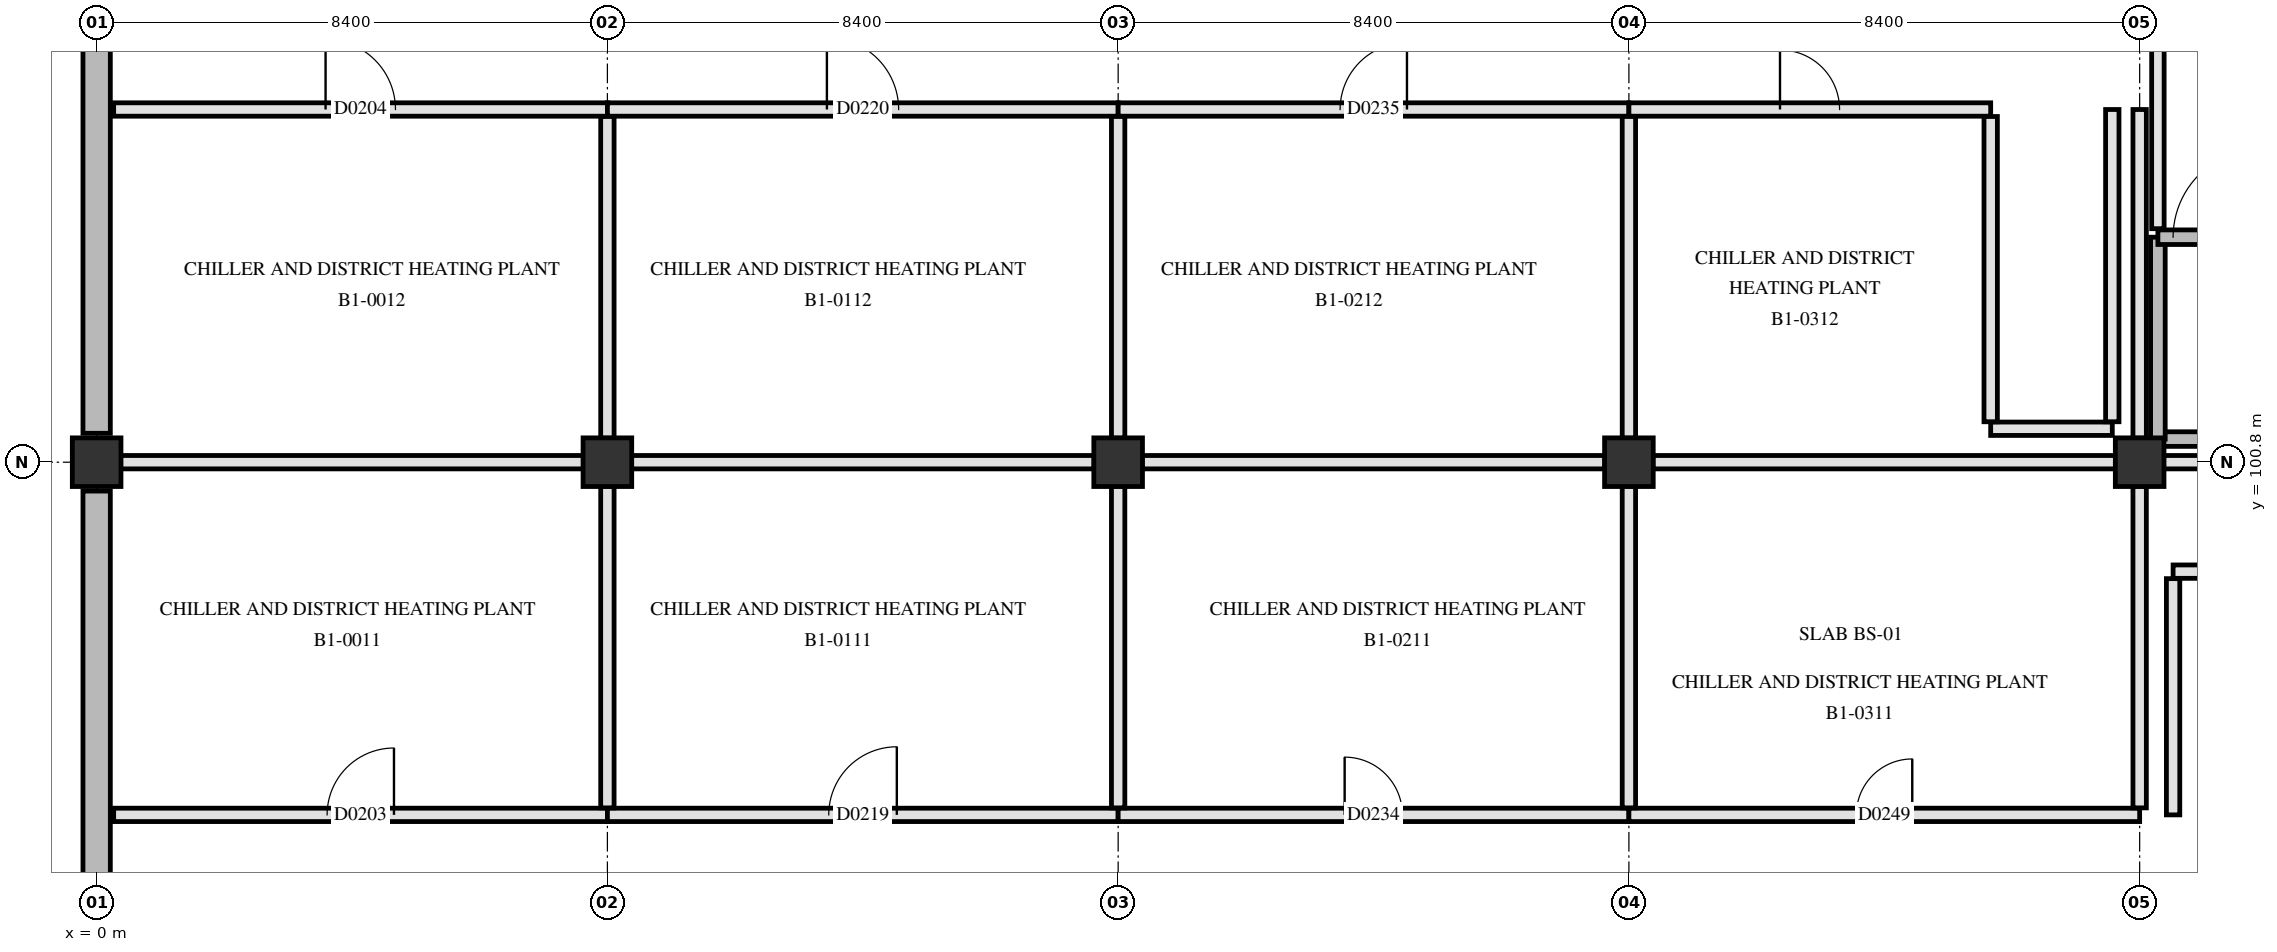
"""IFC4 building model, lengths in metres.
Left out: names, types, materials, properties, quantities, classifications, styles, units other than length and angle.
Written with IfcOpenShell. Run it as: python <this file> out.ifc"""

import sys

from ifc_helpers import new_model, si_unit, direction, frame, frame_2d, origin, origin_2d, place, context, subcontext, project, spatial, rectangle, extrude, element, fill, save


model = new_model("IFC4")
c1 = context("Model", 3, precision=1e-05, world=origin(), true_north=direction((0.0, 1.0)))
c2 = subcontext(c1, "Body", "Model", "MODEL_VIEW")
j1 = project(units=[si_unit("LENGTHUNIT", "METRE"), si_unit("PLANEANGLEUNIT", "RADIAN")], contexts=[c1])
p1 = place(None, origin())
s1 = spatial("IfcSite", under=j1, at=p1, CompositionType="ELEMENT")
p2 = place(p1, origin())
s2 = spatial("IfcBuilding", under=s1, at=p2, CompositionType="ELEMENT")
p3 = place(p2, frame((0.0, 0.0, -5.4)))
s3 = spatial("IfcBuildingStorey", under=s2, at=p3, CompositionType="ELEMENT", Elevation=-5.4)
for number, where, z_axis, x_axis in (
    (1, (0.0, 100.8, 0.0), (0.0, 0.0, 1.0), (1.0, 0.0, 0.0)),
    (2, (8.4, 100.8, 0.0), (0.0, 0.0, 1.0), (1.0, 0.0, 0.0)),
    (3, (16.8, 100.8, 0.0), (0.0, 0.0, 1.0), (1.0, 0.0, 0.0)),
    (4, (25.2, 100.8, 0.0), (0.0, 0.0, 1.0), (1.0, 0.0, 0.0)),
    (5, (33.6, 100.8, 0.0), (0.0, 0.0, 1.0), (1.0, 0.0, 0.0)),
):
    element("IfcColumn", number, at=place(p3, frame(where, z_axis=z_axis, x_axis=x_axis)), inside=s3, PredefinedType="COLUMN", context=c2, shape_type="SweptSolid", body=[
        extrude(rectangle(XDim=0.8, YDim=0.8, at=origin_2d()), origin(), (0.0, 0.0, 1.0), 5.4),
    ])
p4 = place(p3, frame((0.0, 92.875, 0.0), z_axis=(0.0, 0.0, 1.0), x_axis=(0.0, 1.0, 0.0)))
e6 = element("IfcWall", 6, at=p4, inside=s3, PredefinedType="SOLIDWALL", context=c2, shape_type="SweptSolid", body=[
    extrude(rectangle(XDim=7.45, YDim=0.45, at=frame_2d((3.725, 0.0))), origin(), (0.0, 0.0, 1.0), 5.08),
])
p5 = place(p3, frame((0.0, 101.275, 0.0), z_axis=(0.0, 0.0, 1.0), x_axis=(0.0, 1.0, 0.0)))
e7 = element("IfcWall", 7, at=p5, inside=s3, PredefinedType="SOLIDWALL", context=c2, shape_type="SweptSolid", body=[
    extrude(rectangle(XDim=7.45, YDim=0.45, at=frame_2d((3.725, 0.0))), origin(), (0.0, 0.0, 1.0), 5.08),
])
p6 = place(p3, frame((33.9, 101.18, 0.0), z_axis=(0.0, 0.0, 1.0), x_axis=(1.0, 0.0, 0.0)))
e8 = element("IfcWall", 8, at=p6, inside=s3, PredefinedType="SHEAR", context=c2, shape_type="SweptSolid", body=[
    extrude(rectangle(XDim=7.82, YDim=0.24, at=frame_2d((3.91, 0.0))), origin(), (0.0, 0.0, 1.0), 5.08),
])
p7 = place(p3, frame((33.9, 101.18, 0.0), z_axis=(0.0, 0.0, 1.0), x_axis=(0.0, 1.0, 0.0)))
e9 = element("IfcWall", 9, at=p7, inside=s3, PredefinedType="SHEAR", context=c2, shape_type="SweptSolid", body=[
    extrude(rectangle(XDim=3.32, YDim=0.24, at=frame_2d((1.66, 0.0))), origin(), (0.0, 0.0, 1.0), 5.08),
])
p8 = place(p3, frame((33.9, 104.5, 0.0), z_axis=(0.0, 0.0, 1.0), x_axis=(1.0, 0.0, 0.0)))
e10 = element("IfcWall", 10, at=p8, inside=s3, PredefinedType="SHEAR", context=c2, shape_type="SweptSolid", body=[
    extrude(rectangle(XDim=7.82, YDim=0.24, at=frame_2d((3.91, 0.0))), origin(), (0.0, 0.0, 1.0), 5.08),
])
p9 = place(p8, frame((0.25, 0.0, 0.0)))
e11 = element("IfcOpeningElement", 11, at=p9, cuts=e10, PredefinedType="OPENING", context=c2, shape_type="SweptSolid", body=[
    extrude(rectangle(XDim=1.45, YDim=2.2, at=frame_2d((0.725, 1.1))), frame((0.0, 0.13, 0.0), z_axis=(0.0, -1.0, 0.0), x_axis=(1.0, 0.0, 0.0)), (0.0, 0.0, 1.0), 0.26),
])
p10 = place(p3, frame((33.9, 104.64, 0.0), z_axis=(0.0, 0.0, 1.0), x_axis=(0.0, 1.0, 0.0)))
e12 = element("IfcWall", 12, at=p10, inside=s3, PredefinedType="PARTITIONING", context=c2, shape_type="SweptSolid", body=[
    extrude(rectangle(XDim=4.12, YDim=0.205, at=frame_2d((2.06, 0.0))), origin(), (0.0, 0.0, 1.0), 4.47),
])
p11 = place(p3, frame((0.28, 95.0, 0.0), z_axis=(0.0, 0.0, 1.0), x_axis=(1.0, 0.0, 0.0)))
e13 = element("IfcWall", 13, at=p11, inside=s3, PredefinedType="PARTITIONING", context=c2, shape_type="SweptSolid", body=[
    extrude(rectangle(XDim=8.12, YDim=0.22, at=frame_2d((4.06, 0.0))), origin(), (0.0, 0.0, 1.0), 4.47),
])
p12 = place(p11, frame((3.51, 0.0, 0.0)))
e14 = element("IfcOpeningElement", 14, at=p12, cuts=e13, PredefinedType="OPENING", context=c2, shape_type="SweptSolid", body=[
    extrude(rectangle(XDim=1.1, YDim=2.15, at=frame_2d((0.55, 1.075))), frame((0.0, 0.12, 0.0), z_axis=(0.0, -1.0, 0.0), x_axis=(1.0, 0.0, 0.0)), (0.0, 0.0, 1.0), 0.24),
])
p13 = place(p3, frame((8.4, 95.0, 0.0), z_axis=(0.0, 0.0, 1.0), x_axis=(1.0, 0.0, 0.0)))
e15 = element("IfcWall", 15, at=p13, inside=s3, PredefinedType="PARTITIONING", context=c2, shape_type="SweptSolid", body=[
    extrude(rectangle(XDim=8.4, YDim=0.22, at=frame_2d((4.2, 0.0))), origin(), (0.0, 0.0, 1.0), 4.47),
])
p14 = place(p13, frame((3.64, 0.0, 0.0)))
e16 = element("IfcOpeningElement", 16, at=p14, cuts=e15, PredefinedType="OPENING", context=c2, shape_type="SweptSolid", body=[
    extrude(rectangle(XDim=1.12, YDim=2.18, at=frame_2d((0.56, 1.09))), frame((0.0, 0.12, 0.0), z_axis=(0.0, -1.0, 0.0), x_axis=(1.0, 0.0, 0.0)), (0.0, 0.0, 1.0), 0.24),
])
p15 = place(p3, frame((16.8, 95.0, 0.0), z_axis=(0.0, 0.0, 1.0), x_axis=(1.0, 0.0, 0.0)))
e17 = element("IfcWall", 17, at=p15, inside=s3, PredefinedType="PARTITIONING", context=c2, shape_type="SweptSolid", body=[
    extrude(rectangle(XDim=8.4, YDim=0.22, at=frame_2d((4.2, 0.0))), origin(), (0.0, 0.0, 1.0), 4.47),
])
p16 = place(p15, frame((3.725, 0.0, 0.0)))
e18 = element("IfcOpeningElement", 18, at=p16, cuts=e17, PredefinedType="OPENING", context=c2, shape_type="SweptSolid", body=[
    extrude(rectangle(XDim=0.95, YDim=2.1, at=frame_2d((0.475, 1.05))), frame((0.0, 0.12, 0.0), z_axis=(0.0, -1.0, 0.0), x_axis=(1.0, 0.0, 0.0)), (0.0, 0.0, 1.0), 0.24),
])
p17 = place(p3, frame((25.2, 95.0, 0.0), z_axis=(0.0, 0.0, 1.0), x_axis=(1.0, 0.0, 0.0)))
e19 = element("IfcWall", 19, at=p17, inside=s3, PredefinedType="PARTITIONING", context=c2, shape_type="SweptSolid", body=[
    extrude(rectangle(XDim=8.4, YDim=0.22, at=frame_2d((4.2, 0.0))), origin(), (0.0, 0.0, 1.0), 4.47),
])
p18 = place(p17, frame((3.74, 0.0, 0.0)))
e20 = element("IfcOpeningElement", 20, at=p18, cuts=e19, PredefinedType="OPENING", context=c2, shape_type="SweptSolid", body=[
    extrude(rectangle(XDim=0.92, YDim=2.08, at=frame_2d((0.46, 1.04))), frame((0.0, 0.12, 0.0), z_axis=(0.0, -1.0, 0.0), x_axis=(1.0, 0.0, 0.0)), (0.0, 0.0, 1.0), 0.24),
])
p19 = place(p3, frame((34.15, 99.0, 0.0), z_axis=(0.0, 0.0, 1.0), x_axis=(1.0, 0.0, 0.0)))
e21 = element("IfcWall", 21, at=p19, inside=s3, PredefinedType="PARTITIONING", context=c2, shape_type="SweptSolid", body=[
    extrude(rectangle(XDim=2.1, YDim=0.22, at=frame_2d((1.05, 0.0))), origin(), (0.0, 0.0, 1.0), 5.07),
])
p20 = place(p3, frame((0.395, 100.8, 0.0), z_axis=(0.0, 0.0, 1.0), x_axis=(1.0, 0.0, 0.0)))
e22 = element("IfcWall", 22, at=p20, inside=s3, PredefinedType="PARTITIONING", context=c2, shape_type="SweptSolid", body=[
    extrude(rectangle(XDim=7.61, YDim=0.22, at=frame_2d((3.805, 0.0))), origin(), (0.0, 0.0, 1.0), 4.42),
])
p21 = place(p3, frame((8.795, 100.8, 0.0), z_axis=(0.0, 0.0, 1.0), x_axis=(1.0, 0.0, 0.0)))
e23 = element("IfcWall", 23, at=p21, inside=s3, PredefinedType="PARTITIONING", context=c2, shape_type="SweptSolid", body=[
    extrude(rectangle(XDim=7.61, YDim=0.22, at=frame_2d((3.805, 0.0))), origin(), (0.0, 0.0, 1.0), 4.42),
])
p22 = place(p3, frame((17.195, 100.8, 0.0), z_axis=(0.0, 0.0, 1.0), x_axis=(1.0, 0.0, 0.0)))
e24 = element("IfcWall", 24, at=p22, inside=s3, PredefinedType="PARTITIONING", context=c2, shape_type="SweptSolid", body=[
    extrude(rectangle(XDim=7.61, YDim=0.22, at=frame_2d((3.805, 0.0))), origin(), (0.0, 0.0, 1.0), 4.42),
])
p23 = place(p3, frame((25.595, 100.8, 0.0), z_axis=(0.0, 0.0, 1.0), x_axis=(1.0, 0.0, 0.0)))
e25 = element("IfcWall", 25, at=p23, inside=s3, PredefinedType="PARTITIONING", context=c2, shape_type="SweptSolid", body=[
    extrude(rectangle(XDim=7.61, YDim=0.22, at=frame_2d((3.805, 0.0))), origin(), (0.0, 0.0, 1.0), 4.42),
])
p24 = place(p3, frame((33.995, 100.8, 0.0), z_axis=(0.0, 0.0, 1.0), x_axis=(1.0, 0.0, 0.0)))
e26 = element("IfcWall", 26, at=p24, inside=s3, PredefinedType="PARTITIONING", context=c2, shape_type="SweptSolid", body=[
    extrude(rectangle(XDim=7.61, YDim=0.22, at=frame_2d((3.805, 0.0))), origin(), (0.0, 0.0, 1.0), 4.42),
])
p25 = place(p3, frame((31.15, 101.35, 0.0), z_axis=(0.0, 0.0, 1.0), x_axis=(1.0, 0.0, 0.0)))
e27 = element("IfcWall", 27, at=p25, inside=s3, PredefinedType="PARTITIONING", context=c2, shape_type="SweptSolid", body=[
    extrude(rectangle(XDim=2.0, YDim=0.22, at=frame_2d((1.0, 0.0))), origin(), (0.0, 0.0, 1.0), 5.07),
])
p26 = place(p3, frame((0.28, 106.6, 0.0), z_axis=(0.0, 0.0, 1.0), x_axis=(1.0, 0.0, 0.0)))
e28 = element("IfcWall", 28, at=p26, inside=s3, PredefinedType="PARTITIONING", context=c2, shape_type="SweptSolid", body=[
    extrude(rectangle(XDim=8.12, YDim=0.22, at=frame_2d((4.06, 0.0))), origin(), (0.0, 0.0, 1.0), 4.47),
])
p27 = place(p26, frame((3.485, 0.0, 0.0)))
e29 = element("IfcOpeningElement", 29, at=p27, cuts=e28, PredefinedType="OPENING", context=c2, shape_type="SweptSolid", body=[
    extrude(rectangle(XDim=1.15, YDim=2.15, at=frame_2d((0.575, 1.075))), frame((0.0, 0.12, 0.0), z_axis=(0.0, -1.0, 0.0), x_axis=(1.0, 0.0, 0.0)), (0.0, 0.0, 1.0), 0.24),
])
p28 = place(p3, frame((8.4, 106.6, 0.0), z_axis=(0.0, 0.0, 1.0), x_axis=(1.0, 0.0, 0.0)))
e30 = element("IfcWall", 30, at=p28, inside=s3, PredefinedType="PARTITIONING", context=c2, shape_type="SweptSolid", body=[
    extrude(rectangle(XDim=8.4, YDim=0.22, at=frame_2d((4.2, 0.0))), origin(), (0.0, 0.0, 1.0), 4.47),
])
p29 = place(p28, frame((3.61, 0.0, 0.0)))
e31 = element("IfcOpeningElement", 31, at=p29, cuts=e30, PredefinedType="OPENING", context=c2, shape_type="SweptSolid", body=[
    extrude(rectangle(XDim=1.18, YDim=2.18, at=frame_2d((0.59, 1.09))), frame((0.0, 0.12, 0.0), z_axis=(0.0, -1.0, 0.0), x_axis=(1.0, 0.0, 0.0)), (0.0, 0.0, 1.0), 0.24),
])
p30 = place(p3, frame((16.8, 106.6, 0.0), z_axis=(0.0, 0.0, 1.0), x_axis=(1.0, 0.0, 0.0)))
e32 = element("IfcWall", 32, at=p30, inside=s3, PredefinedType="PARTITIONING", context=c2, shape_type="SweptSolid", body=[
    extrude(rectangle(XDim=8.4, YDim=0.22, at=frame_2d((4.2, 0.0))), origin(), (0.0, 0.0, 1.0), 4.47),
])
p31 = place(p30, frame((3.65, 0.0, 0.0)))
e33 = element("IfcOpeningElement", 33, at=p31, cuts=e32, PredefinedType="OPENING", context=c2, shape_type="SweptSolid", body=[
    extrude(rectangle(XDim=1.1, YDim=2.15, at=frame_2d((0.55, 1.075))), frame((0.0, 0.12, 0.0), z_axis=(0.0, -1.0, 0.0), x_axis=(1.0, 0.0, 0.0)), (0.0, 0.0, 1.0), 0.24),
])
p32 = place(p3, frame((25.2, 106.6, 0.0), z_axis=(0.0, 0.0, 1.0), x_axis=(1.0, 0.0, 0.0)))
e34 = element("IfcWall", 34, at=p32, inside=s3, PredefinedType="PARTITIONING", context=c2, shape_type="SweptSolid", body=[
    extrude(rectangle(XDim=5.95, YDim=0.22, at=frame_2d((2.975, 0.0))), origin(), (0.0, 0.0, 1.0), 4.47),
])
p33 = place(p32, frame((2.485, 0.0, 0.0)))
e35 = element("IfcOpeningElement", 35, at=p33, cuts=e34, PredefinedType="OPENING", context=c2, shape_type="SweptSolid", body=[
    extrude(rectangle(XDim=0.98, YDim=2.12, at=frame_2d((0.49, 1.06))), frame((0.0, 0.12, 0.0), z_axis=(0.0, -1.0, 0.0), x_axis=(1.0, 0.0, 0.0)), (0.0, 0.0, 1.0), 0.24),
])
for number, where, z_axis, x_axis in (
    (36, (8.4, 95.115, 0.0), (0.0, 0.0, 1.0), (0.0, 1.0, 0.0)),
    (37, (8.4, 101.195, 0.0), (0.0, 0.0, 1.0), (0.0, 1.0, 0.0)),
    (38, (16.8, 95.115, 0.0), (0.0, 0.0, 1.0), (0.0, 1.0, 0.0)),
    (39, (16.8, 101.195, 0.0), (0.0, 0.0, 1.0), (0.0, 1.0, 0.0)),
    (40, (25.2, 95.115, 0.0), (0.0, 0.0, 1.0), (0.0, 1.0, 0.0)),
    (41, (25.2, 101.195, 0.0), (0.0, 0.0, 1.0), (0.0, 1.0, 0.0)),
):
    element("IfcWall", number, at=place(p3, frame(where, z_axis=z_axis, x_axis=x_axis)), inside=s3, PredefinedType="PARTITIONING", context=c2, shape_type="SweptSolid", body=[
        extrude(rectangle(XDim=5.29, YDim=0.22, at=frame_2d((2.645, 0.0))), origin(), (0.0, 0.0, 1.0), 4.47),
    ])
p34 = place(p3, frame((31.15, 101.465, 0.0), z_axis=(0.0, 0.0, 1.0), x_axis=(0.0, 1.0, 0.0)))
e42 = element("IfcWall", 42, at=p34, inside=s3, PredefinedType="PARTITIONING", context=c2, shape_type="SweptSolid", body=[
    extrude(rectangle(XDim=5.02, YDim=0.22, at=frame_2d((2.51, 0.0))), origin(), (0.0, 0.0, 1.0), 5.07),
])
p35 = place(p3, frame((33.15, 101.465, 0.0), z_axis=(0.0, 0.0, 1.0), x_axis=(0.0, 1.0, 0.0)))
e43 = element("IfcWall", 43, at=p35, inside=s3, PredefinedType="PARTITIONING", context=c2, shape_type="SweptSolid", body=[
    extrude(rectangle(XDim=5.135, YDim=0.22, at=frame_2d((2.567, 0.0))), origin(), (0.0, 0.0, 1.0), 5.07),
])
p36 = place(p3, frame((33.6, 95.115, 0.0), z_axis=(0.0, 0.0, 1.0), x_axis=(0.0, 1.0, 0.0)))
e44 = element("IfcWall", 44, at=p36, inside=s3, PredefinedType="PARTITIONING", context=c2, shape_type="SweptSolid", body=[
    extrude(rectangle(XDim=5.29, YDim=0.22, at=frame_2d((2.645, 0.0))), origin(), (0.0, 0.0, 1.0), 4.47),
])
p37 = place(p3, frame((33.6, 101.195, 0.0), z_axis=(0.0, 0.0, 1.0), x_axis=(0.0, 1.0, 0.0)))
e45 = element("IfcWall", 45, at=p37, inside=s3, PredefinedType="PARTITIONING", context=c2, shape_type="SweptSolid", body=[
    extrude(rectangle(XDim=5.405, YDim=0.22, at=frame_2d((2.703, 0.0))), origin(), (0.0, 0.0, 1.0), 4.47),
])
p38 = place(p3, frame((34.15, 95.0, 0.0), z_axis=(0.0, 0.0, 1.0), x_axis=(0.0, 1.0, 0.0)))
e46 = element("IfcWall", 46, at=p38, inside=s3, PredefinedType="PARTITIONING", context=c2, shape_type="SweptSolid", body=[
    extrude(rectangle(XDim=3.885, YDim=0.22, at=frame_2d((1.942, 0.0))), origin(), (0.0, 0.0, 1.0), 5.07),
])
p39 = place(p9, origin())
e47 = element("IfcDoor", 47, at=p39, inside=s3, OperationType="SINGLE_SWING_RIGHT", PredefinedType="DOOR", context=c2, shape_type="SweptSolid", body=[
    extrude(rectangle(XDim=1.45, YDim=2.2, at=frame_2d((0.725, 1.1))), frame((0.0, 0.025, 0.0), z_axis=(0.0, -1.0, 0.0), x_axis=(1.0, 0.0, 0.0)), (0.0, 0.0, 1.0), 0.05),
])
fill(e11, e47)
p40 = place(p12, origin())
e48 = element("IfcDoor", 48, at=p40, inside=s3, OperationType="SINGLE_SWING_RIGHT", PredefinedType="DOOR", context=c2, shape_type="SweptSolid", body=[
    extrude(rectangle(XDim=1.1, YDim=2.15, at=frame_2d((0.55, 1.075))), frame((0.0, 0.025, 0.0), z_axis=(0.0, -1.0, 0.0), x_axis=(1.0, 0.0, 0.0)), (0.0, 0.0, 1.0), 0.05),
])
fill(e14, e48)
p41 = place(p27, origin())
e49 = element("IfcDoor", 49, at=p41, inside=s3, OperationType="SINGLE_SWING_LEFT", PredefinedType="DOOR", context=c2, shape_type="SweptSolid", body=[
    extrude(rectangle(XDim=1.15, YDim=2.15, at=frame_2d((0.575, 1.075))), frame((0.0, 0.025, 0.0), z_axis=(0.0, -1.0, 0.0), x_axis=(1.0, 0.0, 0.0)), (0.0, 0.0, 1.0), 0.05),
])
fill(e29, e49)
p42 = place(p14, origin())
e50 = element("IfcDoor", 50, at=p42, inside=s3, OperationType="SINGLE_SWING_RIGHT", PredefinedType="DOOR", context=c2, shape_type="SweptSolid", body=[
    extrude(rectangle(XDim=1.12, YDim=2.18, at=frame_2d((0.56, 1.09))), frame((0.0, 0.025, 0.0), z_axis=(0.0, -1.0, 0.0), x_axis=(1.0, 0.0, 0.0)), (0.0, 0.0, 1.0), 0.05),
])
fill(e16, e50)
p43 = place(p29, origin())
e51 = element("IfcDoor", 51, at=p43, inside=s3, OperationType="SINGLE_SWING_LEFT", PredefinedType="DOOR", context=c2, shape_type="SweptSolid", body=[
    extrude(rectangle(XDim=1.18, YDim=2.18, at=frame_2d((0.59, 1.09))), frame((0.0, 0.025, 0.0), z_axis=(0.0, -1.0, 0.0), x_axis=(1.0, 0.0, 0.0)), (0.0, 0.0, 1.0), 0.05),
])
fill(e31, e51)
p44 = place(p16, origin())
e52 = element("IfcDoor", 52, at=p44, inside=s3, OperationType="SINGLE_SWING_LEFT", PredefinedType="DOOR", context=c2, shape_type="SweptSolid", body=[
    extrude(rectangle(XDim=0.95, YDim=2.1, at=frame_2d((0.475, 1.05))), frame((0.0, 0.025, 0.0), z_axis=(0.0, -1.0, 0.0), x_axis=(1.0, 0.0, 0.0)), (0.0, 0.0, 1.0), 0.05),
])
fill(e18, e52)
p45 = place(p31, origin())
e53 = element("IfcDoor", 53, at=p45, inside=s3, OperationType="SINGLE_SWING_RIGHT", PredefinedType="DOOR", context=c2, shape_type="SweptSolid", body=[
    extrude(rectangle(XDim=1.1, YDim=2.15, at=frame_2d((0.55, 1.075))), frame((0.0, 0.025, 0.0), z_axis=(0.0, -1.0, 0.0), x_axis=(1.0, 0.0, 0.0)), (0.0, 0.0, 1.0), 0.05),
])
fill(e33, e53)
p46 = place(p18, origin())
e54 = element("IfcDoor", 54, at=p46, inside=s3, OperationType="SINGLE_SWING_RIGHT", PredefinedType="DOOR", context=c2, shape_type="SweptSolid", body=[
    extrude(rectangle(XDim=0.92, YDim=2.08, at=frame_2d((0.46, 1.04))), frame((0.0, 0.025, 0.0), z_axis=(0.0, -1.0, 0.0), x_axis=(1.0, 0.0, 0.0)), (0.0, 0.0, 1.0), 0.05),
])
fill(e20, e54)
p47 = place(p33, origin())
e55 = element("IfcDoor", 55, at=p47, inside=s3, OperationType="SINGLE_SWING_LEFT", PredefinedType="DOOR", context=c2, shape_type="SweptSolid", body=[
    extrude(rectangle(XDim=0.98, YDim=2.12, at=frame_2d((0.49, 1.06))), frame((0.0, 0.025, 0.0), z_axis=(0.0, -1.0, 0.0), x_axis=(1.0, 0.0, 0.0)), (0.0, 0.0, 1.0), 0.05),
])
fill(e35, e55)
save(model, sys.argv[1])
